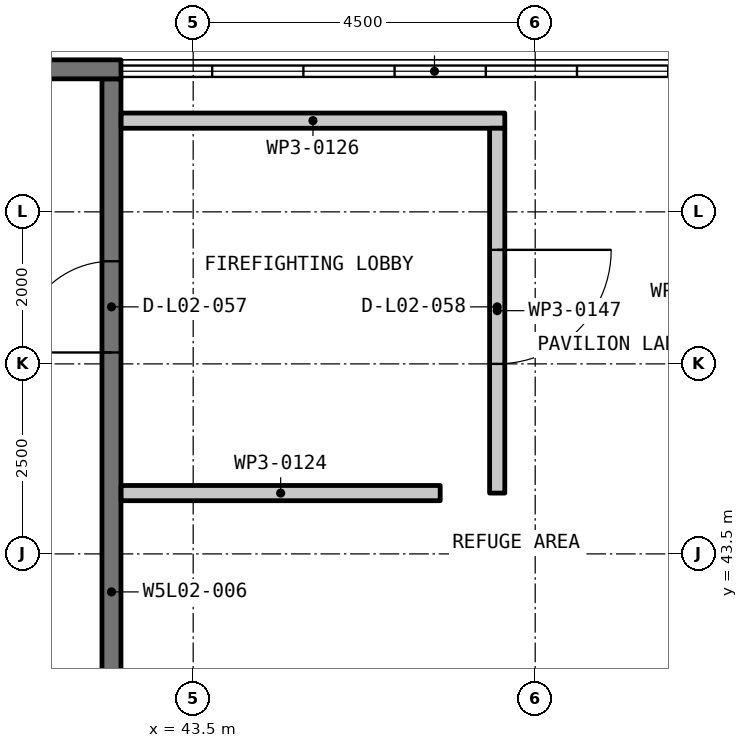
"""IFC4 building model, lengths in metres.
Left out: names, types, materials, properties, quantities, classifications, styles, units other than length and angle.
Written with IfcOpenShell. Run it as: python <this file> out.ifc"""

import sys

from ifc_helpers import new_model, si_unit, direction, frame, frame_2d, origin, place, context, subcontext, project, spatial, rectangle, extrude, element, fill, save


model = new_model("IFC4")
c1 = context("Model", 3, precision=1e-05, world=origin(), true_north=direction((0.0, 1.0)))
c2 = subcontext(c1, "Body", "Model", "MODEL_VIEW")
j1 = project(units=[si_unit("LENGTHUNIT", "METRE"), si_unit("PLANEANGLEUNIT", "RADIAN")], contexts=[c1])
p1 = place(None, origin())
s1 = spatial("IfcSite", under=j1, at=p1, CompositionType="ELEMENT")
p2 = place(p1, origin())
s2 = spatial("IfcBuilding", under=s1, at=p2, CompositionType="ELEMENT")
p3 = place(p2, frame((0.0, 0.0, 11.25)))
s3 = spatial("IfcBuildingStorey", under=s2, at=p3, CompositionType="ELEMENT", Elevation=11.25)
p4 = place(p3, frame((42.425, 36.25, -0.3), z_axis=(0.0, 0.0, 1.0), x_axis=(0.0, 1.0, 0.0)))
e1 = element("IfcWall", 1, at=p4, inside=s3, PredefinedType="SHEAR", context=c2, shape_type="SweptSolid", body=[
    extrude(rectangle(XDim=13.5, YDim=0.25, at=frame_2d((6.75, 0.0))), origin(), (0.0, 0.0, 1.0), 4.5),
])
p5 = place(p4, frame((9.9, 0.0, 0.3)))
e2 = element("IfcOpeningElement", 2, at=p5, cuts=e1, PredefinedType="OPENING", context=c2, shape_type="SweptSolid", body=[
    extrude(rectangle(XDim=1.2, YDim=2.2, at=frame_2d((0.6, 1.1))), frame((0.0, 0.135, 0.0), z_axis=(0.0, -1.0, 0.0), x_axis=(1.0, 0.0, 0.0)), (0.0, 0.0, 1.0), 0.27),
])
p6 = place(p3, frame((36.0, 49.875, -0.3), z_axis=(0.0, 0.0, 1.0), x_axis=(1.0, 0.0, 0.0)))
e3 = element("IfcWall", 3, at=p6, inside=s3, PredefinedType="SHEAR", context=c2, shape_type="SweptSolid", body=[
    extrude(rectangle(XDim=6.55, YDim=0.25, at=frame_2d((3.275, 0.0))), origin(), (0.0, 0.0, 1.0), 4.5),
])
p7 = place(p3, frame((42.552, 44.3, 0.0), z_axis=(0.0, 0.0, 1.0), x_axis=(1.0, 0.0, 0.0)))
e4 = element("IfcWall", 4, at=p7, inside=s3, PredefinedType="PARTITIONING", context=c2, shape_type="SweptSolid", body=[
    extrude(rectangle(XDim=4.198, YDim=0.2, at=frame_2d((2.099, 0.0))), origin(), (0.0, 0.0, 1.0), 4.2),
])
p8 = place(p3, frame((42.552, 49.2, 0.0), z_axis=(0.0, 0.0, 1.0), x_axis=(1.0, 0.0, 0.0)))
e5 = element("IfcWall", 5, at=p8, inside=s3, PredefinedType="PARTITIONING", context=c2, shape_type="SweptSolid", body=[
    extrude(rectangle(XDim=5.048, YDim=0.2, at=frame_2d((2.524, 0.0))), origin(), (0.0, 0.0, 1.0), 4.2),
])
p9 = place(p3, frame((47.5, 49.1, 0.0), z_axis=(0.0, 0.0, 1.0), x_axis=(0.0, -1.0, 0.0)))
e6 = element("IfcWall", 6, at=p9, inside=s3, PredefinedType="PARTITIONING", context=c2, shape_type="SweptSolid", body=[
    extrude(rectangle(XDim=4.8, YDim=0.2, at=frame_2d((2.4, 0.0))), origin(), (0.0, 0.0, 1.0), 3.4),
])
p10 = place(p9, frame((1.6, 0.0, 0.0)))
e7 = element("IfcOpeningElement", 7, at=p10, cuts=e6, PredefinedType="OPENING", context=c2, shape_type="SweptSolid", body=[
    extrude(rectangle(XDim=1.5, YDim=2.1, at=frame_2d((0.75, 1.05))), frame((0.0, 0.11, 0.0), z_axis=(0.0, -1.0, 0.0), x_axis=(1.0, 0.0, 0.0)), (0.0, 0.0, 1.0), 0.22),
])
p11 = place(p5, origin())
e8 = element("IfcDoor", 8, at=p11, inside=s3, OperationType="SINGLE_SWING_LEFT", PredefinedType="DOOR", context=c2, shape_type="SweptSolid", body=[
    extrude(rectangle(XDim=1.2, YDim=2.2, at=frame_2d((0.6, 1.1))), frame((0.0, 0.025, 0.0), z_axis=(0.0, -1.0, 0.0), x_axis=(1.0, 0.0, 0.0)), (0.0, 0.0, 1.0), 0.05),
])
fill(e2, e8)
p12 = place(p10, origin())
e9 = element("IfcDoor", 9, at=p12, inside=s3, OperationType="DOUBLE_DOOR_SINGLE_SWING", PredefinedType="DOOR", context=c2, shape_type="SweptSolid", body=[
    extrude(rectangle(XDim=1.5, YDim=2.1, at=frame_2d((0.75, 1.05))), frame((0.0, 0.025, 0.0), z_axis=(0.0, -1.0, 0.0), x_axis=(1.0, 0.0, 0.0)), (0.0, 0.0, 1.0), 0.05),
])
fill(e7, e9)
save(model, sys.argv[1])
